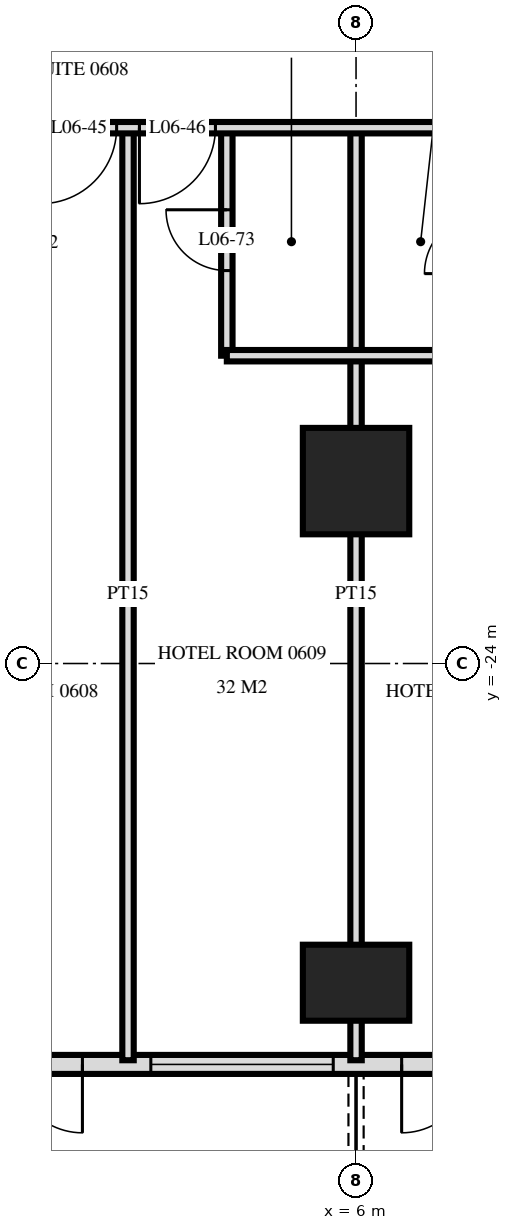
"""IFC4 building model, lengths in metres.
Left out: names, types, materials, properties, quantities, classifications, styles, units other than length and angle.
Written with IfcOpenShell. Run it as: python <this file> out.ifc"""

import sys

from ifc_helpers import new_model, si_unit, direction, frame, frame_2d, origin, origin_2d, place, context, subcontext, project, spatial, rectangle, extrude, element, fill, save


model = new_model("IFC4")
c1 = context("Model", 3, precision=1e-05, world=origin(), true_north=direction((0.0, 1.0)))
c2 = subcontext(c1, "Body", "Model", "MODEL_VIEW")
j1 = project(units=[si_unit("LENGTHUNIT", "METRE"), si_unit("PLANEANGLEUNIT", "RADIAN")], contexts=[c1])
p1 = place(None, origin())
s1 = spatial("IfcSite", under=j1, at=p1, CompositionType="ELEMENT")
p2 = place(p1, origin())
s2 = spatial("IfcBuilding", under=s1, at=p2, CompositionType="ELEMENT")
p3 = place(p2, frame((0.0, 0.0, 31.2)))
s3 = spatial("IfcBuildingStorey", under=s2, at=p3, CompositionType="ELEMENT", Elevation=31.2)
p4 = place(p3, frame((6.0, -28.2, 0.0), z_axis=(0.0, 0.0, 1.0), x_axis=(1.0, 0.0, 0.0)))
e1 = element("IfcColumn", 1, at=p4, inside=s3, PredefinedType="COLUMN", context=c2, shape_type="SweptSolid", body=[
    extrude(rectangle(XDim=1.4, YDim=1.0, at=origin_2d()), origin(), (0.0, 0.0, 1.0), 3.6),
])
p5 = place(p3, frame((6.0, -21.6, 0.0), z_axis=(0.0, 0.0, 1.0), x_axis=(1.0, 0.0, 0.0)))
e2 = element("IfcColumn", 2, at=p5, inside=s3, PredefinedType="COLUMN", context=c2, shape_type="SweptSolid", body=[
    extrude(rectangle(XDim=1.4, YDim=1.4, at=origin_2d()), origin(), (0.0, 0.0, 1.0), 3.6),
])
p6 = place(p3, frame((-28.775, -29.275, 0.0), z_axis=(0.0, 0.0, 1.0), x_axis=(1.0, 0.0, 0.0)))
e3 = element("IfcWall", 3, at=p6, inside=s3, PredefinedType="SOLIDWALL", context=c2, shape_type="SweptSolid", body=[
    extrude(rectangle(XDim=57.551, YDim=0.25, at=frame_2d((28.775, 0.0))), origin(), (0.0, 0.0, 1.0), 3.32),
])
p7 = place(p6, frame((0.575, 0.0, 0.0)))
e4 = element("IfcOpeningElement", 4, at=p7, cuts=e3, PredefinedType="OPENING", context=c2, shape_type="SweptSolid", body=[
    extrude(rectangle(XDim=1.8, YDim=2.4, at=frame_2d((0.9, 1.2))), frame((0.0, 0.135, 0.0), z_axis=(0.0, -1.0, 0.0), x_axis=(1.0, 0.0, 0.0)), (0.0, 0.0, 1.0), 0.27),
])
p8 = place(p6, frame((5.375, 0.0, 0.0)))
e5 = element("IfcOpeningElement", 5, at=p8, cuts=e3, PredefinedType="OPENING", context=c2, shape_type="SweptSolid", body=[
    extrude(rectangle(XDim=1.8, YDim=2.4, at=frame_2d((0.9, 1.2))), frame((0.0, 0.135, 0.0), z_axis=(0.0, -1.0, 0.0), x_axis=(1.0, 0.0, 0.0)), (0.0, 0.0, 1.0), 0.27),
])
p9 = place(p6, frame((8.075, 0.0, 0.3)))
e6 = element("IfcOpeningElement", 6, at=p9, cuts=e3, PredefinedType="OPENING", context=c2, shape_type="SweptSolid", body=[
    extrude(rectangle(XDim=2.4, YDim=2.1, at=frame_2d((1.2, 1.05))), frame((0.0, 0.135, 0.0), z_axis=(0.0, -1.0, 0.0), x_axis=(1.0, 0.0, 0.0)), (0.0, 0.0, 1.0), 0.27),
])
p10 = place(p6, frame((11.375, 0.0, 0.0)))
e7 = element("IfcOpeningElement", 7, at=p10, cuts=e3, PredefinedType="OPENING", context=c2, shape_type="SweptSolid", body=[
    extrude(rectangle(XDim=1.8, YDim=2.4, at=frame_2d((0.9, 1.2))), frame((0.0, 0.135, 0.0), z_axis=(0.0, -1.0, 0.0), x_axis=(1.0, 0.0, 0.0)), (0.0, 0.0, 1.0), 0.27),
])
p11 = place(p6, frame((14.075, 0.0, 0.3)))
e8 = element("IfcOpeningElement", 8, at=p11, cuts=e3, PredefinedType="OPENING", context=c2, shape_type="SweptSolid", body=[
    extrude(rectangle(XDim=2.4, YDim=2.1, at=frame_2d((1.2, 1.05))), frame((0.0, 0.135, 0.0), z_axis=(0.0, -1.0, 0.0), x_axis=(1.0, 0.0, 0.0)), (0.0, 0.0, 1.0), 0.27),
])
p12 = place(p6, frame((17.375, 0.0, 0.0)))
e9 = element("IfcOpeningElement", 9, at=p12, cuts=e3, PredefinedType="OPENING", context=c2, shape_type="SweptSolid", body=[
    extrude(rectangle(XDim=1.8, YDim=2.4, at=frame_2d((0.9, 1.2))), frame((0.0, 0.135, 0.0), z_axis=(0.0, -1.0, 0.0), x_axis=(1.0, 0.0, 0.0)), (0.0, 0.0, 1.0), 0.27),
])
p13 = place(p6, frame((20.075, 0.0, 0.3)))
e10 = element("IfcOpeningElement", 10, at=p13, cuts=e3, PredefinedType="OPENING", context=c2, shape_type="SweptSolid", body=[
    extrude(rectangle(XDim=2.4, YDim=2.1, at=frame_2d((1.2, 1.05))), frame((0.0, 0.135, 0.0), z_axis=(0.0, -1.0, 0.0), x_axis=(1.0, 0.0, 0.0)), (0.0, 0.0, 1.0), 0.27),
])
p14 = place(p6, frame((23.075, 0.0, 0.3)))
e11 = element("IfcOpeningElement", 11, at=p14, cuts=e3, PredefinedType="OPENING", context=c2, shape_type="SweptSolid", body=[
    extrude(rectangle(XDim=2.4, YDim=2.1, at=frame_2d((1.2, 1.05))), frame((0.0, 0.135, 0.0), z_axis=(0.0, -1.0, 0.0), x_axis=(1.0, 0.0, 0.0)), (0.0, 0.0, 1.0), 0.27),
])
p15 = place(p6, frame((26.375, 0.0, 0.0)))
e12 = element("IfcOpeningElement", 12, at=p15, cuts=e3, PredefinedType="OPENING", context=c2, shape_type="SweptSolid", body=[
    extrude(rectangle(XDim=1.8, YDim=2.4, at=frame_2d((0.9, 1.2))), frame((0.0, 0.135, 0.0), z_axis=(0.0, -1.0, 0.0), x_axis=(1.0, 0.0, 0.0)), (0.0, 0.0, 1.0), 0.27),
])
p16 = place(p6, frame((29.375, 0.0, 0.0)))
e13 = element("IfcOpeningElement", 13, at=p16, cuts=e3, PredefinedType="OPENING", context=c2, shape_type="SweptSolid", body=[
    extrude(rectangle(XDim=1.8, YDim=2.4, at=frame_2d((0.9, 1.2))), frame((0.0, 0.135, 0.0), z_axis=(0.0, -1.0, 0.0), x_axis=(1.0, 0.0, 0.0)), (0.0, 0.0, 1.0), 0.27),
])
p17 = place(p6, frame((32.075, 0.0, 0.3)))
e14 = element("IfcOpeningElement", 14, at=p17, cuts=e3, PredefinedType="OPENING", context=c2, shape_type="SweptSolid", body=[
    extrude(rectangle(XDim=2.4, YDim=2.1, at=frame_2d((1.2, 1.05))), frame((0.0, 0.135, 0.0), z_axis=(0.0, -1.0, 0.0), x_axis=(1.0, 0.0, 0.0)), (0.0, 0.0, 1.0), 0.27),
])
p18 = place(p6, frame((35.375, 0.0, 0.0)))
e15 = element("IfcOpeningElement", 15, at=p18, cuts=e3, PredefinedType="OPENING", context=c2, shape_type="SweptSolid", body=[
    extrude(rectangle(XDim=1.8, YDim=2.4, at=frame_2d((0.9, 1.2))), frame((0.0, 0.135, 0.0), z_axis=(0.0, -1.0, 0.0), x_axis=(1.0, 0.0, 0.0)), (0.0, 0.0, 1.0), 0.27),
])
p19 = place(p6, frame((38.075, 0.0, 0.3)))
e16 = element("IfcOpeningElement", 16, at=p19, cuts=e3, PredefinedType="OPENING", context=c2, shape_type="SweptSolid", body=[
    extrude(rectangle(XDim=2.4, YDim=2.1, at=frame_2d((1.2, 1.05))), frame((0.0, 0.135, 0.0), z_axis=(0.0, -1.0, 0.0), x_axis=(1.0, 0.0, 0.0)), (0.0, 0.0, 1.0), 0.27),
])
p20 = place(p6, frame((41.375, 0.0, 0.0)))
e17 = element("IfcOpeningElement", 17, at=p20, cuts=e3, PredefinedType="OPENING", context=c2, shape_type="SweptSolid", body=[
    extrude(rectangle(XDim=1.8, YDim=2.4, at=frame_2d((0.9, 1.2))), frame((0.0, 0.135, 0.0), z_axis=(0.0, -1.0, 0.0), x_axis=(1.0, 0.0, 0.0)), (0.0, 0.0, 1.0), 0.27),
])
p21 = place(p6, frame((44.075, 0.0, 0.3)))
e18 = element("IfcOpeningElement", 18, at=p21, cuts=e3, PredefinedType="OPENING", context=c2, shape_type="SweptSolid", body=[
    extrude(rectangle(XDim=2.4, YDim=2.1, at=frame_2d((1.2, 1.05))), frame((0.0, 0.135, 0.0), z_axis=(0.0, -1.0, 0.0), x_axis=(1.0, 0.0, 0.0)), (0.0, 0.0, 1.0), 0.27),
])
p22 = place(p6, frame((47.075, 0.0, 0.3)))
e19 = element("IfcOpeningElement", 19, at=p22, cuts=e3, PredefinedType="OPENING", context=c2, shape_type="SweptSolid", body=[
    extrude(rectangle(XDim=2.4, YDim=2.1, at=frame_2d((1.2, 1.05))), frame((0.0, 0.135, 0.0), z_axis=(0.0, -1.0, 0.0), x_axis=(1.0, 0.0, 0.0)), (0.0, 0.0, 1.0), 0.27),
])
p23 = place(p6, frame((50.375, 0.0, 0.0)))
e20 = element("IfcOpeningElement", 20, at=p23, cuts=e3, PredefinedType="OPENING", context=c2, shape_type="SweptSolid", body=[
    extrude(rectangle(XDim=1.8, YDim=2.4, at=frame_2d((0.9, 1.2))), frame((0.0, 0.135, 0.0), z_axis=(0.0, -1.0, 0.0), x_axis=(1.0, 0.0, 0.0)), (0.0, 0.0, 1.0), 0.27),
])
p24 = place(p6, frame((53.375, 0.0, 0.0)))
e21 = element("IfcOpeningElement", 21, at=p24, cuts=e3, PredefinedType="OPENING", context=c2, shape_type="SweptSolid", body=[
    extrude(rectangle(XDim=1.8, YDim=2.4, at=frame_2d((0.9, 1.2))), frame((0.0, 0.135, 0.0), z_axis=(0.0, -1.0, 0.0), x_axis=(1.0, 0.0, 0.0)), (0.0, 0.0, 1.0), 0.27),
])
p25 = place(p3, frame((6.0, -29.22, 0.0), z_axis=(0.0, 0.0, 1.0), x_axis=(0.0, 1.0, 0.0)))
e22 = element("IfcWall", 22, at=p25, inside=s3, PredefinedType="PARTITIONING", context=c2, shape_type="SweptSolid", body=[
    extrude(rectangle(XDim=12.27, YDim=0.15, at=frame_2d((6.135, 0.0))), origin(), (0.0, 0.0, 1.0), 3.32),
])
p26 = place(p3, frame((4.3, -19.95, 0.0), z_axis=(0.0, 0.0, 1.0), x_axis=(0.0, 1.0, 0.0)))
e23 = element("IfcWall", 23, at=p26, inside=s3, PredefinedType="PARTITIONING", context=c2, shape_type="SweptSolid", body=[
    extrude(rectangle(XDim=3.0, YDim=0.15, at=frame_2d((1.5, 0.0))), origin(), (0.0, 0.0, 1.0), 3.32),
])
p27 = place(p26, frame((1.12, 0.0, 0.0)))
e24 = element("IfcOpeningElement", 24, at=p27, cuts=e23, PredefinedType="OPENING", context=c2, shape_type="SweptSolid", body=[
    extrude(rectangle(XDim=0.8, YDim=2.1, at=frame_2d((0.4, 1.05))), frame((0.0, 0.085, 0.0), z_axis=(0.0, -1.0, 0.0), x_axis=(1.0, 0.0, 0.0)), (0.0, 0.0, 1.0), 0.17),
])
p28 = place(p3, frame((3.0, -29.22, 0.0), z_axis=(0.0, 0.0, 1.0), x_axis=(0.0, 1.0, 0.0)))
e25 = element("IfcWall", 25, at=p28, inside=s3, PredefinedType="PARTITIONING", context=c2, shape_type="SweptSolid", body=[
    extrude(rectangle(XDim=12.27, YDim=0.15, at=frame_2d((6.135, 0.0))), origin(), (0.0, 0.0, 1.0), 3.32),
])
p29 = place(p3, frame((4.3, -19.95, 0.0), z_axis=(0.0, 0.0, 1.0), x_axis=(1.0, 0.0, 0.0)))
e26 = element("IfcWall", 26, at=p29, inside=s3, PredefinedType="PARTITIONING", context=c2, shape_type="SweptSolid", body=[
    extrude(rectangle(XDim=3.4, YDim=0.15, at=frame_2d((1.7, 0.0))), origin(), (0.0, 0.0, 1.0), 3.32),
])
p30 = place(p3, frame((-33.12, -16.95, 0.0), z_axis=(0.0, 0.0, 1.0), x_axis=(1.0, 0.0, 0.0)))
e27 = element("IfcWall", 27, at=p30, inside=s3, PredefinedType="PARTITIONING", context=c2, shape_type="SweptSolid", body=[
    extrude(rectangle(XDim=66.24, YDim=0.15, at=frame_2d((33.12, 0.0))), origin(), (0.0, 0.0, 1.0), 3.32),
])
p31 = place(p30, frame((9.27, 0.0, 0.0)))
e28 = element("IfcOpeningElement", 28, at=p31, cuts=e27, PredefinedType="OPENING", context=c2, shape_type="SweptSolid", body=[
    extrude(rectangle(XDim=1.0, YDim=2.1, at=frame_2d((0.5, 1.05))), frame((0.0, 0.085, 0.0), z_axis=(0.0, -1.0, 0.0), x_axis=(1.0, 0.0, 0.0)), (0.0, 0.0, 1.0), 0.17),
])
p32 = place(p30, frame((13.97, 0.0, 0.0)))
e29 = element("IfcOpeningElement", 29, at=p32, cuts=e27, PredefinedType="OPENING", context=c2, shape_type="SweptSolid", body=[
    extrude(rectangle(XDim=1.0, YDim=2.1, at=frame_2d((0.5, 1.05))), frame((0.0, 0.085, 0.0), z_axis=(0.0, -1.0, 0.0), x_axis=(1.0, 0.0, 0.0)), (0.0, 0.0, 1.0), 0.17),
])
p33 = place(p30, frame((15.27, 0.0, 0.0)))
e30 = element("IfcOpeningElement", 30, at=p33, cuts=e27, PredefinedType="OPENING", context=c2, shape_type="SweptSolid", body=[
    extrude(rectangle(XDim=1.0, YDim=2.1, at=frame_2d((0.5, 1.05))), frame((0.0, 0.085, 0.0), z_axis=(0.0, -1.0, 0.0), x_axis=(1.0, 0.0, 0.0)), (0.0, 0.0, 1.0), 0.17),
])
p34 = place(p30, frame((19.97, 0.0, 0.0)))
e31 = element("IfcOpeningElement", 31, at=p34, cuts=e27, PredefinedType="OPENING", context=c2, shape_type="SweptSolid", body=[
    extrude(rectangle(XDim=1.0, YDim=2.1, at=frame_2d((0.5, 1.05))), frame((0.0, 0.085, 0.0), z_axis=(0.0, -1.0, 0.0), x_axis=(1.0, 0.0, 0.0)), (0.0, 0.0, 1.0), 0.17),
])
p35 = place(p30, frame((22.27, 0.0, 0.0)))
e32 = element("IfcOpeningElement", 32, at=p35, cuts=e27, PredefinedType="OPENING", context=c2, shape_type="SweptSolid", body=[
    extrude(rectangle(XDim=1.0, YDim=2.1, at=frame_2d((0.5, 1.05))), frame((0.0, 0.085, 0.0), z_axis=(0.0, -1.0, 0.0), x_axis=(1.0, 0.0, 0.0)), (0.0, 0.0, 1.0), 0.17),
])
p36 = place(p30, frame((28.97, 0.0, 0.0)))
e33 = element("IfcOpeningElement", 33, at=p36, cuts=e27, PredefinedType="OPENING", context=c2, shape_type="SweptSolid", body=[
    extrude(rectangle(XDim=1.0, YDim=2.1, at=frame_2d((0.5, 1.05))), frame((0.0, 0.085, 0.0), z_axis=(0.0, -1.0, 0.0), x_axis=(1.0, 0.0, 0.0)), (0.0, 0.0, 1.0), 0.17),
])
p37 = place(p30, frame((30.27, 0.0, 0.0)))
e34 = element("IfcOpeningElement", 34, at=p37, cuts=e27, PredefinedType="OPENING", context=c2, shape_type="SweptSolid", body=[
    extrude(rectangle(XDim=1.0, YDim=2.1, at=frame_2d((0.5, 1.05))), frame((0.0, 0.085, 0.0), z_axis=(0.0, -1.0, 0.0), x_axis=(1.0, 0.0, 0.0)), (0.0, 0.0, 1.0), 0.17),
])
p38 = place(p30, frame((34.97, 0.0, 0.0)))
e35 = element("IfcOpeningElement", 35, at=p38, cuts=e27, PredefinedType="OPENING", context=c2, shape_type="SweptSolid", body=[
    extrude(rectangle(XDim=1.0, YDim=2.1, at=frame_2d((0.5, 1.05))), frame((0.0, 0.085, 0.0), z_axis=(0.0, -1.0, 0.0), x_axis=(1.0, 0.0, 0.0)), (0.0, 0.0, 1.0), 0.17),
])
p39 = place(p30, frame((36.27, 0.0, 0.0)))
e36 = element("IfcOpeningElement", 36, at=p39, cuts=e27, PredefinedType="OPENING", context=c2, shape_type="SweptSolid", body=[
    extrude(rectangle(XDim=1.0, YDim=2.1, at=frame_2d((0.5, 1.05))), frame((0.0, 0.085, 0.0), z_axis=(0.0, -1.0, 0.0), x_axis=(1.0, 0.0, 0.0)), (0.0, 0.0, 1.0), 0.17),
])
p40 = place(p30, frame((40.97, 0.0, 0.0)))
e37 = element("IfcOpeningElement", 37, at=p40, cuts=e27, PredefinedType="OPENING", context=c2, shape_type="SweptSolid", body=[
    extrude(rectangle(XDim=1.0, YDim=2.1, at=frame_2d((0.5, 1.05))), frame((0.0, 0.085, 0.0), z_axis=(0.0, -1.0, 0.0), x_axis=(1.0, 0.0, 0.0)), (0.0, 0.0, 1.0), 0.17),
])
p41 = place(p30, frame((42.27, 0.0, 0.0)))
e38 = element("IfcOpeningElement", 38, at=p41, cuts=e27, PredefinedType="OPENING", context=c2, shape_type="SweptSolid", body=[
    extrude(rectangle(XDim=1.0, YDim=2.1, at=frame_2d((0.5, 1.05))), frame((0.0, 0.085, 0.0), z_axis=(0.0, -1.0, 0.0), x_axis=(1.0, 0.0, 0.0)), (0.0, 0.0, 1.0), 0.17),
])
p42 = place(p30, frame((46.97, 0.0, 0.0)))
e39 = element("IfcOpeningElement", 39, at=p42, cuts=e27, PredefinedType="OPENING", context=c2, shape_type="SweptSolid", body=[
    extrude(rectangle(XDim=1.0, YDim=2.1, at=frame_2d((0.5, 1.05))), frame((0.0, 0.085, 0.0), z_axis=(0.0, -1.0, 0.0), x_axis=(1.0, 0.0, 0.0)), (0.0, 0.0, 1.0), 0.17),
])
p43 = place(p30, frame((48.27, 0.0, 0.0)))
e40 = element("IfcOpeningElement", 40, at=p43, cuts=e27, PredefinedType="OPENING", context=c2, shape_type="SweptSolid", body=[
    extrude(rectangle(XDim=1.0, YDim=2.1, at=frame_2d((0.5, 1.05))), frame((0.0, 0.085, 0.0), z_axis=(0.0, -1.0, 0.0), x_axis=(1.0, 0.0, 0.0)), (0.0, 0.0, 1.0), 0.17),
])
p44 = place(p30, frame((52.97, 0.0, 0.0)))
e41 = element("IfcOpeningElement", 41, at=p44, cuts=e27, PredefinedType="OPENING", context=c2, shape_type="SweptSolid", body=[
    extrude(rectangle(XDim=1.0, YDim=2.1, at=frame_2d((0.5, 1.05))), frame((0.0, 0.085, 0.0), z_axis=(0.0, -1.0, 0.0), x_axis=(1.0, 0.0, 0.0)), (0.0, 0.0, 1.0), 0.17),
])
p45 = place(p30, frame((54.27, 0.0, 0.0)))
e42 = element("IfcOpeningElement", 42, at=p45, cuts=e27, PredefinedType="OPENING", context=c2, shape_type="SweptSolid", body=[
    extrude(rectangle(XDim=1.0, YDim=2.1, at=frame_2d((0.5, 1.05))), frame((0.0, 0.085, 0.0), z_axis=(0.0, -1.0, 0.0), x_axis=(1.0, 0.0, 0.0)), (0.0, 0.0, 1.0), 0.17),
])
p46 = place(p30, frame((4.4, 0.0, 0.0)))
e43 = element("IfcOpeningElement", 43, at=p46, cuts=e27, PredefinedType="OPENING", context=c2, shape_type="SweptSolid", body=[
    extrude(rectangle(XDim=1.0, YDim=2.1, at=frame_2d((0.5, 1.05))), frame((0.0, 0.085, 0.0), z_axis=(0.0, -1.0, 0.0), x_axis=(1.0, 0.0, 0.0)), (0.0, 0.0, 1.0), 0.17),
])
p47 = place(p30, frame((60.8, 0.0, 0.0)))
e44 = element("IfcOpeningElement", 44, at=p47, cuts=e27, PredefinedType="OPENING", context=c2, shape_type="SweptSolid", body=[
    extrude(rectangle(XDim=1.0, YDim=2.1, at=frame_2d((0.5, 1.05))), frame((0.0, 0.085, 0.0), z_axis=(0.0, -1.0, 0.0), x_axis=(1.0, 0.0, 0.0)), (0.0, 0.0, 1.0), 0.17),
])
p48 = place(p16, frame((0.9, 0.0, 0.0), z_axis=(0.0, 0.0, 1.0), x_axis=(-1.0, 0.0, 0.0)))
e45 = element("IfcDoor", 45, at=p48, inside=s3, OperationType="DOUBLE_DOOR_SINGLE_SWING", PredefinedType="DOOR", context=c2, shape_type="SweptSolid", body=[
    extrude(rectangle(XDim=1.8, YDim=2.4, at=frame_2d((0.0, 1.2))), frame((0.0, -0.025, 0.0), z_axis=(0.0, 1.0, 0.0), x_axis=(-1.0, 0.0, 0.0)), (0.0, 0.0, 1.0), 0.05),
])
fill(e13, e45)
p49 = place(p17, origin())
e46 = element("IfcWindow", 46, at=p49, inside=s3, PartitioningType="SINGLE_PANEL", PredefinedType="WINDOW", context=c2, shape_type="SweptSolid", body=[
    extrude(rectangle(XDim=2.4, YDim=2.1, at=frame_2d((1.2, 1.05))), frame((0.0, 0.03, 0.0), z_axis=(0.0, -1.0, 0.0), x_axis=(1.0, 0.0, 0.0)), (0.0, 0.0, 1.0), 0.06),
])
fill(e14, e46)
p50 = place(p18, frame((0.9, 0.0, 0.0), z_axis=(0.0, 0.0, 1.0), x_axis=(-1.0, 0.0, 0.0)))
e47 = element("IfcDoor", 47, at=p50, inside=s3, OperationType="DOUBLE_DOOR_SINGLE_SWING", PredefinedType="DOOR", context=c2, shape_type="SweptSolid", body=[
    extrude(rectangle(XDim=1.8, YDim=2.4, at=frame_2d((0.0, 1.2))), frame((0.0, -0.025, 0.0), z_axis=(0.0, 1.0, 0.0), x_axis=(-1.0, 0.0, 0.0)), (0.0, 0.0, 1.0), 0.05),
])
fill(e15, e47)
p51 = place(p38, frame((0.5, 0.0, 0.0), z_axis=(0.0, 0.0, 1.0), x_axis=(-1.0, 0.0, 0.0)))
e48 = element("IfcDoor", 48, at=p51, inside=s3, OperationType="SINGLE_SWING_LEFT", PredefinedType="DOOR", context=c2, shape_type="SweptSolid", body=[
    extrude(rectangle(XDim=1.0, YDim=2.1, at=frame_2d((0.0, 1.05))), frame((0.0, -0.025, 0.0), z_axis=(0.0, 1.0, 0.0), x_axis=(-1.0, 0.0, 0.0)), (0.0, 0.0, 1.0), 0.05),
])
fill(e35, e48)
p52 = place(p39, frame((0.5, 0.0, 0.0), z_axis=(0.0, 0.0, 1.0), x_axis=(-1.0, 0.0, 0.0)))
e49 = element("IfcDoor", 49, at=p52, inside=s3, OperationType="SINGLE_SWING_LEFT", PredefinedType="DOOR", context=c2, shape_type="SweptSolid", body=[
    extrude(rectangle(XDim=1.0, YDim=2.1, at=frame_2d((0.0, 1.05))), frame((0.0, -0.025, 0.0), z_axis=(0.0, 1.0, 0.0), x_axis=(-1.0, 0.0, 0.0)), (0.0, 0.0, 1.0), 0.05),
])
fill(e36, e49)
p53 = place(p27, origin())
e50 = element("IfcDoor", 50, at=p53, inside=s3, OperationType="SINGLE_SWING_LEFT", PredefinedType="DOOR", context=c2, shape_type="SweptSolid", body=[
    extrude(rectangle(XDim=0.8, YDim=2.1, at=frame_2d((0.4, 1.05))), frame((0.0, 0.025, 0.0), z_axis=(0.0, -1.0, 0.0), x_axis=(1.0, 0.0, 0.0)), (0.0, 0.0, 1.0), 0.05),
])
fill(e24, e50)
save(model, sys.argv[1])
